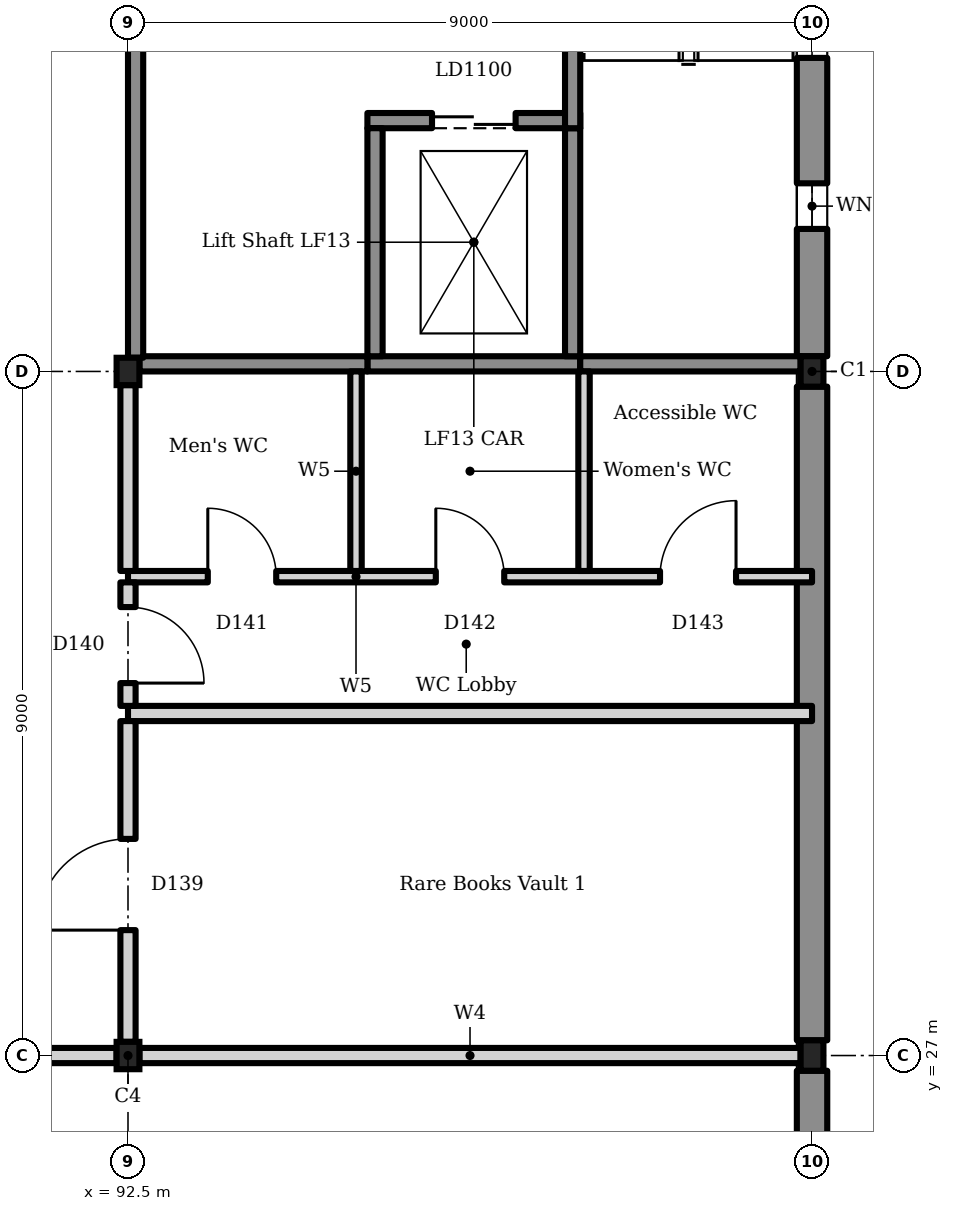
"""IFC4 building model, lengths in metres.
Left out: names, types, materials, properties, quantities, classifications, styles, units other than length and angle.
Written with IfcOpenShell. Run it as: python <this file> out.ifc"""

import sys

from ifc_helpers import new_model, si_unit, direction, frame, frame_2d, origin, origin_2d, place, context, subcontext, project, spatial, rectangle, i_section, extrude, element, fill, save


model = new_model("IFC4")
c1 = context("Model", 3, precision=1e-05, world=origin(), true_north=direction((0.0, 1.0)))
c2 = subcontext(c1, "Body", "Model", "MODEL_VIEW")
j1 = project(units=[si_unit("LENGTHUNIT", "METRE"), si_unit("PLANEANGLEUNIT", "RADIAN")], contexts=[c1])
p1 = place(None, origin())
s1 = spatial("IfcSite", under=j1, at=p1, CompositionType="ELEMENT")
p2 = place(p1, origin())
s2 = spatial("IfcBuilding", under=s1, at=p2, CompositionType="ELEMENT")
p3 = place(p2, frame((0.0, 0.0, 18.9)))
s3 = spatial("IfcBuildingStorey", under=s2, at=p3, CompositionType="ELEMENT", Elevation=18.9)
p4 = place(p3, frame((92.5, 27.0, 0.0), z_axis=(0.0, 0.0, 1.0), x_axis=(1.0, 0.0, 0.0)))
e1 = element("IfcColumn", 1, at=p4, inside=s3, PredefinedType="COLUMN", context=c2, shape_type="SweptSolid", body=[
    extrude(i_section(OverallWidth=0.3, OverallDepth=0.36, WebThickness=0.012, FlangeThickness=0.022, FilletRadius=0.027, at=origin_2d()), origin(), (0.0, 0.0, 1.0), 4.5),
])
p5 = place(p3, frame((101.5, 27.0, 0.0), z_axis=(0.0, 0.0, 1.0), x_axis=(1.0, 0.0, 0.0)))
e2 = element("IfcColumn", 2, at=p5, inside=s3, PredefinedType="COLUMN", context=c2, shape_type="SweptSolid", body=[
    extrude(i_section(OverallWidth=0.3, OverallDepth=0.4, WebThickness=0.013, FlangeThickness=0.024, FilletRadius=0.027, at=origin_2d()), origin(), (0.0, 0.0, 1.0), 4.5),
])
p6 = place(p3, frame((92.5, 36.0, 0.0), z_axis=(0.0, 0.0, 1.0), x_axis=(1.0, 0.0, 0.0)))
e3 = element("IfcColumn", 3, at=p6, inside=s3, PredefinedType="COLUMN", context=c2, shape_type="SweptSolid", body=[
    extrude(i_section(OverallWidth=0.3, OverallDepth=0.36, WebThickness=0.012, FlangeThickness=0.022, FilletRadius=0.027, at=origin_2d()), origin(), (0.0, 0.0, 1.0), 4.5),
])
p7 = place(p3, frame((101.5, 36.0, 0.0), z_axis=(0.0, 0.0, 1.0), x_axis=(1.0, 0.0, 0.0)))
e4 = element("IfcColumn", 4, at=p7, inside=s3, PredefinedType="COLUMN", context=c2, shape_type="SweptSolid", body=[
    extrude(i_section(OverallWidth=0.3, OverallDepth=0.4, WebThickness=0.013, FlangeThickness=0.024, FilletRadius=0.027, at=origin_2d()), origin(), (0.0, 0.0, 1.0), 4.5),
])
p8 = place(p3, frame((95.65, 36.1, 0.0), z_axis=(0.0, 0.0, 1.0), x_axis=(1.0, 0.0, 0.0)))
e5 = element("IfcWall", 5, at=p8, inside=s3, PredefinedType="SOLIDWALL", context=c2, shape_type="SweptSolid", body=[
    extrude(rectangle(XDim=2.8, YDim=0.2, at=frame_2d((1.4, 0.0))), origin(), (0.0, 0.0, 1.0), 4.25),
])
p9 = place(p3, frame((95.65, 39.3, 0.0), z_axis=(0.0, 0.0, 1.0), x_axis=(1.0, 0.0, 0.0)))
e6 = element("IfcWall", 6, at=p9, inside=s3, PredefinedType="SOLIDWALL", context=c2, shape_type="SweptSolid", body=[
    extrude(rectangle(XDim=2.8, YDim=0.2, at=frame_2d((1.4, 0.0))), origin(), (0.0, 0.0, 1.0), 4.25),
])
p10 = place(p9, frame((0.85, 0.0, 0.0)))
e7 = element("IfcOpeningElement", 7, at=p10, cuts=e6, PredefinedType="OPENING", context=c2, shape_type="SweptSolid", body=[
    extrude(rectangle(XDim=1.1, YDim=2.1, at=frame_2d((0.55, 1.05))), frame((0.0, 0.11, 0.0), z_axis=(0.0, -1.0, 0.0), x_axis=(1.0, 0.0, 0.0)), (0.0, 0.0, 1.0), 0.22),
])
for number, where, z_axis, x_axis in (
    (8, (95.75, 36.2, 0.0), (0.0, 0.0, 1.0), (0.0, 1.0, 0.0)),
    (9, (98.35, 36.2, 0.0), (0.0, 0.0, 1.0), (0.0, 1.0, 0.0)),
):
    element("IfcWall", number, at=place(p3, frame(where, z_axis=z_axis, x_axis=x_axis)), inside=s3, PredefinedType="SOLIDWALL", context=c2, shape_type="SweptSolid", body=[
        extrude(rectangle(XDim=3.0, YDim=0.2, at=frame_2d((1.5, 0.0))), origin(), (0.0, 0.0, 1.0), 4.25),
    ])
p11 = place(p3, frame((101.5, 18.2, 0.0), z_axis=(0.0, 0.0, 1.0), x_axis=(0.0, 1.0, 0.0)))
e10 = element("IfcWall", 10, at=p11, inside=s3, PredefinedType="SOLIDWALL", context=c2, shape_type="SweptSolid", body=[
    extrude(rectangle(XDim=8.6, YDim=0.4, at=frame_2d((4.3, 0.0))), origin(), (0.0, 0.0, 1.0), 4.5),
])
p12 = place(p11, frame((1.825, 0.0, 0.9)))
e11 = element("IfcOpeningElement", 11, at=p12, cuts=e10, PredefinedType="OPENING", context=c2, shape_type="SweptSolid", body=[
    extrude(rectangle(XDim=0.45, YDim=2.6, at=frame_2d((0.225, 1.3))), frame((0.0, 0.21, 0.0), z_axis=(0.0, -1.0, 0.0), x_axis=(1.0, 0.0, 0.0)), (0.0, 0.0, 1.0), 0.42),
])
p13 = place(p11, frame((4.075, 0.0, 0.9)))
e12 = element("IfcOpeningElement", 12, at=p13, cuts=e10, PredefinedType="OPENING", context=c2, shape_type="SweptSolid", body=[
    extrude(rectangle(XDim=0.45, YDim=2.6, at=frame_2d((0.225, 1.3))), frame((0.0, 0.21, 0.0), z_axis=(0.0, -1.0, 0.0), x_axis=(1.0, 0.0, 0.0)), (0.0, 0.0, 1.0), 0.42),
])
p14 = place(p11, frame((6.325, 0.0, 0.9)))
e13 = element("IfcOpeningElement", 13, at=p14, cuts=e10, PredefinedType="OPENING", context=c2, shape_type="SweptSolid", body=[
    extrude(rectangle(XDim=0.45, YDim=2.6, at=frame_2d((0.225, 1.3))), frame((0.0, 0.21, 0.0), z_axis=(0.0, -1.0, 0.0), x_axis=(1.0, 0.0, 0.0)), (0.0, 0.0, 1.0), 0.42),
])
p15 = place(p3, frame((101.5, 27.2, 0.0), z_axis=(0.0, 0.0, 1.0), x_axis=(0.0, 1.0, 0.0)))
e14 = element("IfcWall", 14, at=p15, inside=s3, PredefinedType="SOLIDWALL", context=c2, shape_type="SweptSolid", body=[
    extrude(rectangle(XDim=8.6, YDim=0.4, at=frame_2d((4.3, 0.0))), origin(), (0.0, 0.0, 1.0), 4.5),
])
p16 = place(p3, frame((101.5, 36.2, 0.0), z_axis=(0.0, 0.0, 1.0), x_axis=(0.0, 1.0, 0.0)))
e15 = element("IfcWall", 15, at=p16, inside=s3, PredefinedType="SOLIDWALL", context=c2, shape_type="SweptSolid", body=[
    extrude(rectangle(XDim=8.45, YDim=0.4, at=frame_2d((4.225, 0.0))), origin(), (0.0, 0.0, 1.0), 4.5),
])
p17 = place(p16, frame((1.675, 0.0, 0.9)))
e16 = element("IfcOpeningElement", 16, at=p17, cuts=e15, PredefinedType="OPENING", context=c2, shape_type="SweptSolid", body=[
    extrude(rectangle(XDim=0.6, YDim=2.4, at=frame_2d((0.3, 1.2))), frame((0.0, 0.21, 0.0), z_axis=(0.0, -1.0, 0.0), x_axis=(1.0, 0.0, 0.0)), (0.0, 0.0, 1.0), 0.42),
])
p18 = place(p16, frame((3.925, 0.0, 0.9)))
e17 = element("IfcOpeningElement", 17, at=p18, cuts=e15, PredefinedType="OPENING", context=c2, shape_type="SweptSolid", body=[
    extrude(rectangle(XDim=0.6, YDim=2.4, at=frame_2d((0.3, 1.2))), frame((0.0, 0.21, 0.0), z_axis=(0.0, -1.0, 0.0), x_axis=(1.0, 0.0, 0.0)), (0.0, 0.0, 1.0), 0.42),
])
p19 = place(p16, frame((6.175, 0.0, 0.9)))
e18 = element("IfcOpeningElement", 18, at=p19, cuts=e15, PredefinedType="OPENING", context=c2, shape_type="SweptSolid", body=[
    extrude(rectangle(XDim=0.6, YDim=2.4, at=frame_2d((0.3, 1.2))), frame((0.0, 0.21, 0.0), z_axis=(0.0, -1.0, 0.0), x_axis=(1.0, 0.0, 0.0)), (0.0, 0.0, 1.0), 0.42),
])
p20 = place(p3, frame((92.65, 36.1, 0.0), z_axis=(0.0, 0.0, 1.0), x_axis=(1.0, 0.0, 0.0)))
e19 = element("IfcWall", 19, at=p20, inside=s3, PredefinedType="SOLIDWALL", context=c2, shape_type="SweptSolid", body=[
    extrude(rectangle(XDim=3.0, YDim=0.2, at=frame_2d((1.5, 0.0))), origin(), (0.0, 0.0, 1.0), 4.25),
])
p21 = place(p3, frame((98.45, 36.1, 0.0), z_axis=(0.0, 0.0, 1.0), x_axis=(1.0, 0.0, 0.0)))
e20 = element("IfcWall", 20, at=p21, inside=s3, PredefinedType="SOLIDWALL", context=c2, shape_type="SweptSolid", body=[
    extrude(rectangle(XDim=2.9, YDim=0.2, at=frame_2d((1.45, 0.0))), origin(), (0.0, 0.0, 1.0), 4.25),
])
p22 = place(p3, frame((92.6, 36.18, 0.0), z_axis=(0.0, 0.0, 1.0), x_axis=(0.0, 1.0, 0.0)))
e21 = element("IfcWall", 21, at=p22, inside=s3, PredefinedType="SOLIDWALL", context=c2, shape_type="SweptSolid", body=[
    extrude(rectangle(XDim=8.47, YDim=0.2, at=frame_2d((4.235, 0.0))), origin(), (0.0, 0.0, 1.0), 4.25),
])
p23 = place(p22, frame((4.77, 0.0, 0.0)))
e22 = element("IfcOpeningElement", 22, at=p23, cuts=e21, PredefinedType="OPENING", context=c2, shape_type="SweptSolid", body=[
    extrude(rectangle(XDim=1.1, YDim=2.1, at=frame_2d((0.55, 1.05))), frame((0.0, 0.11, 0.0), z_axis=(0.0, -1.0, 0.0), x_axis=(1.0, 0.0, 0.0)), (0.0, 0.0, 1.0), 0.22),
])
p24 = place(p3, frame((98.35, 39.2, 0.0), z_axis=(0.0, 0.0, 1.0), x_axis=(0.0, 1.0, 0.0)))
e23 = element("IfcWall", 23, at=p24, inside=s3, PredefinedType="SOLIDWALL", context=c2, shape_type="SweptSolid", body=[
    extrude(rectangle(XDim=5.6, YDim=0.2, at=frame_2d((2.8, 0.0))), origin(), (0.0, 0.0, 1.0), 4.25),
])
p25 = place(p24, frame((4.35, 0.0, 0.0)))
e24 = element("IfcOpeningElement", 24, at=p25, cuts=e23, PredefinedType="OPENING", context=c2, shape_type="SweptSolid", body=[
    extrude(rectangle(XDim=1.1, YDim=2.1, at=frame_2d((0.55, 1.05))), frame((0.0, 0.11, 0.0), z_axis=(0.0, -1.0, 0.0), x_axis=(1.0, 0.0, 0.0)), (0.0, 0.0, 1.0), 0.22),
])
p26 = place(p3, frame((86.0, 27.0, 0.0), z_axis=(0.0, 0.0, 1.0), x_axis=(1.0, 0.0, 0.0)))
e25 = element("IfcWall", 25, at=p26, inside=s3, PredefinedType="SOLIDWALL", context=c2, shape_type="SweptSolid", body=[
    extrude(rectangle(XDim=6.35, YDim=0.2, at=frame_2d((3.175, 0.0))), origin(), (0.0, 0.0, 1.0), 3.6),
])
p27 = place(p3, frame((92.65, 27.0, 0.0), z_axis=(0.0, 0.0, 1.0), x_axis=(1.0, 0.0, 0.0)))
e26 = element("IfcWall", 26, at=p27, inside=s3, PredefinedType="SOLIDWALL", context=c2, shape_type="SweptSolid", body=[
    extrude(rectangle(XDim=8.7, YDim=0.2, at=frame_2d((4.35, 0.0))), origin(), (0.0, 0.0, 1.0), 3.6),
])
p28 = place(p3, frame((92.5, 31.5, 0.0), z_axis=(0.0, 0.0, 1.0), x_axis=(1.0, 0.0, 0.0)))
e27 = element("IfcWall", 27, at=p28, inside=s3, PredefinedType="SOLIDWALL", context=c2, shape_type="SweptSolid", body=[
    extrude(rectangle(XDim=9.0, YDim=0.2, at=frame_2d((4.5, 0.0))), origin(), (0.0, 0.0, 1.0), 3.6),
])
p29 = place(p3, frame((92.5, 33.3, 0.0), z_axis=(0.0, 0.0, 1.0), x_axis=(1.0, 0.0, 0.0)))
e28 = element("IfcWall", 28, at=p29, inside=s3, PredefinedType="PARTITIONING", context=c2, shape_type="SweptSolid", body=[
    extrude(rectangle(XDim=9.0, YDim=0.15, at=frame_2d((4.5, 0.0))), origin(), (0.0, 0.0, 1.0), 3.6),
])
p30 = place(p29, frame((1.05, 0.0, 0.0)))
e29 = element("IfcOpeningElement", 29, at=p30, cuts=e28, PredefinedType="OPENING", context=c2, shape_type="SweptSolid", body=[
    extrude(rectangle(XDim=0.9, YDim=2.1, at=frame_2d((0.45, 1.05))), frame((0.0, 0.085, 0.0), z_axis=(0.0, -1.0, 0.0), x_axis=(1.0, 0.0, 0.0)), (0.0, 0.0, 1.0), 0.17),
])
p31 = place(p29, frame((4.05, 0.0, 0.0)))
e30 = element("IfcOpeningElement", 30, at=p31, cuts=e28, PredefinedType="OPENING", context=c2, shape_type="SweptSolid", body=[
    extrude(rectangle(XDim=0.9, YDim=2.1, at=frame_2d((0.45, 1.05))), frame((0.0, 0.085, 0.0), z_axis=(0.0, -1.0, 0.0), x_axis=(1.0, 0.0, 0.0)), (0.0, 0.0, 1.0), 0.17),
])
p32 = place(p29, frame((7.0, 0.0, 0.0)))
e31 = element("IfcOpeningElement", 31, at=p32, cuts=e28, PredefinedType="OPENING", context=c2, shape_type="SweptSolid", body=[
    extrude(rectangle(XDim=1.0, YDim=2.1, at=frame_2d((0.5, 1.05))), frame((0.0, 0.085, 0.0), z_axis=(0.0, -1.0, 0.0), x_axis=(1.0, 0.0, 0.0)), (0.0, 0.0, 1.0), 0.17),
])
p33 = place(p3, frame((92.5, 27.18, 0.0), z_axis=(0.0, 0.0, 1.0), x_axis=(0.0, 1.0, 0.0)))
e32 = element("IfcWall", 32, at=p33, inside=s3, PredefinedType="SOLIDWALL", context=c2, shape_type="SweptSolid", body=[
    extrude(rectangle(XDim=4.22, YDim=0.2, at=frame_2d((2.11, 0.0))), origin(), (0.0, 0.0, 1.0), 3.6),
])
p34 = place(p33, frame((1.47, 0.0, 0.0)))
e33 = element("IfcOpeningElement", 33, at=p34, cuts=e32, PredefinedType="OPENING", context=c2, shape_type="SweptSolid", body=[
    extrude(rectangle(XDim=1.2, YDim=2.1, at=frame_2d((0.6, 1.05))), frame((0.0, 0.11, 0.0), z_axis=(0.0, -1.0, 0.0), x_axis=(1.0, 0.0, 0.0)), (0.0, 0.0, 1.0), 0.22),
])
p35 = place(p3, frame((92.5, 31.6, 0.0), z_axis=(0.0, 0.0, 1.0), x_axis=(0.0, 1.0, 0.0)))
e34 = element("IfcWall", 34, at=p35, inside=s3, PredefinedType="SOLIDWALL", context=c2, shape_type="SweptSolid", body=[
    extrude(rectangle(XDim=1.625, YDim=0.2, at=frame_2d((0.812, 0.0))), origin(), (0.0, 0.0, 1.0), 3.6),
])
p36 = place(p35, frame((0.3, 0.0, 0.0)))
e35 = element("IfcOpeningElement", 35, at=p36, cuts=e34, PredefinedType="OPENING", context=c2, shape_type="SweptSolid", body=[
    extrude(rectangle(XDim=1.0, YDim=2.1, at=frame_2d((0.5, 1.05))), frame((0.0, 0.11, 0.0), z_axis=(0.0, -1.0, 0.0), x_axis=(1.0, 0.0, 0.0)), (0.0, 0.0, 1.0), 0.22),
])
p37 = place(p3, frame((92.5, 33.375, 0.0), z_axis=(0.0, 0.0, 1.0), x_axis=(0.0, 1.0, 0.0)))
e36 = element("IfcWall", 36, at=p37, inside=s3, PredefinedType="SOLIDWALL", context=c2, shape_type="SweptSolid", body=[
    extrude(rectangle(XDim=2.445, YDim=0.2, at=frame_2d((1.223, 0.0))), origin(), (0.0, 0.0, 1.0), 3.6),
])
for number, where, z_axis, x_axis in (
    (37, (95.5, 33.375, 0.0), (0.0, 0.0, 1.0), (0.0, 1.0, 0.0)),
    (38, (98.5, 33.375, 0.0), (0.0, 0.0, 1.0), (0.0, 1.0, 0.0)),
):
    element("IfcWall", number, at=place(p3, frame(where, z_axis=z_axis, x_axis=x_axis)), inside=s3, PredefinedType="PARTITIONING", context=c2, shape_type="SweptSolid", body=[
        extrude(rectangle(XDim=2.625, YDim=0.15, at=frame_2d((1.312, 0.0))), origin(), (0.0, 0.0, 1.0), 3.6),
    ])
p38 = place(p10, origin())
e39 = element("IfcDoor", 39, at=p38, inside=s3, OperationType="SLIDING_TO_LEFT", PredefinedType="DOOR", context=c2, shape_type="SweptSolid", body=[
    extrude(rectangle(XDim=1.1, YDim=2.1, at=frame_2d((0.55, 1.05))), frame((0.0, 0.025, 0.0), z_axis=(0.0, -1.0, 0.0), x_axis=(1.0, 0.0, 0.0)), (0.0, 0.0, 1.0), 0.05),
])
fill(e7, e39)
p39 = place(p17, origin())
e40 = element("IfcWindow", 40, at=p39, inside=s3, PartitioningType="SINGLE_PANEL", PredefinedType="WINDOW", context=c2, shape_type="SweptSolid", body=[
    extrude(rectangle(XDim=0.6, YDim=2.4, at=frame_2d((0.3, 1.2))), frame((0.0, 0.03, 0.0), z_axis=(0.0, -1.0, 0.0), x_axis=(1.0, 0.0, 0.0)), (0.0, 0.0, 1.0), 0.06),
])
fill(e16, e40)
p40 = place(p18, origin())
e41 = element("IfcWindow", 41, at=p40, inside=s3, PartitioningType="SINGLE_PANEL", PredefinedType="WINDOW", context=c2, shape_type="SweptSolid", body=[
    extrude(rectangle(XDim=0.6, YDim=2.4, at=frame_2d((0.3, 1.2))), frame((0.0, 0.03, 0.0), z_axis=(0.0, -1.0, 0.0), x_axis=(1.0, 0.0, 0.0)), (0.0, 0.0, 1.0), 0.06),
])
fill(e17, e41)
p41 = place(p34, origin())
e42 = element("IfcDoor", 42, at=p41, inside=s3, OperationType="DOUBLE_DOOR_SINGLE_SWING", PredefinedType="DOOR", context=c2, shape_type="SweptSolid", body=[
    extrude(rectangle(XDim=1.2, YDim=2.1, at=frame_2d((0.6, 1.05))), frame((0.0, 0.025, 0.0), z_axis=(0.0, -1.0, 0.0), x_axis=(1.0, 0.0, 0.0)), (0.0, 0.0, 1.0), 0.05),
])
fill(e33, e42)
p42 = place(p36, frame((1.0, 0.0, 0.0), z_axis=(0.0, 0.0, 1.0), x_axis=(-1.0, 0.0, 0.0)))
e43 = element("IfcDoor", 43, at=p42, inside=s3, OperationType="SINGLE_SWING_LEFT", PredefinedType="DOOR", context=c2, shape_type="SweptSolid", body=[
    extrude(rectangle(XDim=1.0, YDim=2.1, at=frame_2d((0.5, 1.05))), frame((0.0, 0.025, 0.0), z_axis=(0.0, -1.0, 0.0), x_axis=(1.0, 0.0, 0.0)), (0.0, 0.0, 1.0), 0.05),
])
fill(e35, e43)
p43 = place(p30, origin())
e44 = element("IfcDoor", 44, at=p43, inside=s3, OperationType="SINGLE_SWING_RIGHT", PredefinedType="DOOR", context=c2, shape_type="SweptSolid", body=[
    extrude(rectangle(XDim=0.9, YDim=2.1, at=frame_2d((0.45, 1.05))), frame((0.0, 0.025, 0.0), z_axis=(0.0, -1.0, 0.0), x_axis=(1.0, 0.0, 0.0)), (0.0, 0.0, 1.0), 0.05),
])
fill(e29, e44)
p44 = place(p31, origin())
e45 = element("IfcDoor", 45, at=p44, inside=s3, OperationType="SINGLE_SWING_RIGHT", PredefinedType="DOOR", context=c2, shape_type="SweptSolid", body=[
    extrude(rectangle(XDim=0.9, YDim=2.1, at=frame_2d((0.45, 1.05))), frame((0.0, 0.025, 0.0), z_axis=(0.0, -1.0, 0.0), x_axis=(1.0, 0.0, 0.0)), (0.0, 0.0, 1.0), 0.05),
])
fill(e30, e45)
p45 = place(p32, origin())
e46 = element("IfcDoor", 46, at=p45, inside=s3, OperationType="SINGLE_SWING_LEFT", PredefinedType="DOOR", context=c2, shape_type="SweptSolid", body=[
    extrude(rectangle(XDim=1.0, YDim=2.1, at=frame_2d((0.5, 1.05))), frame((0.0, 0.025, 0.0), z_axis=(0.0, -1.0, 0.0), x_axis=(1.0, 0.0, 0.0)), (0.0, 0.0, 1.0), 0.05),
])
fill(e31, e46)
save(model, sys.argv[1])
